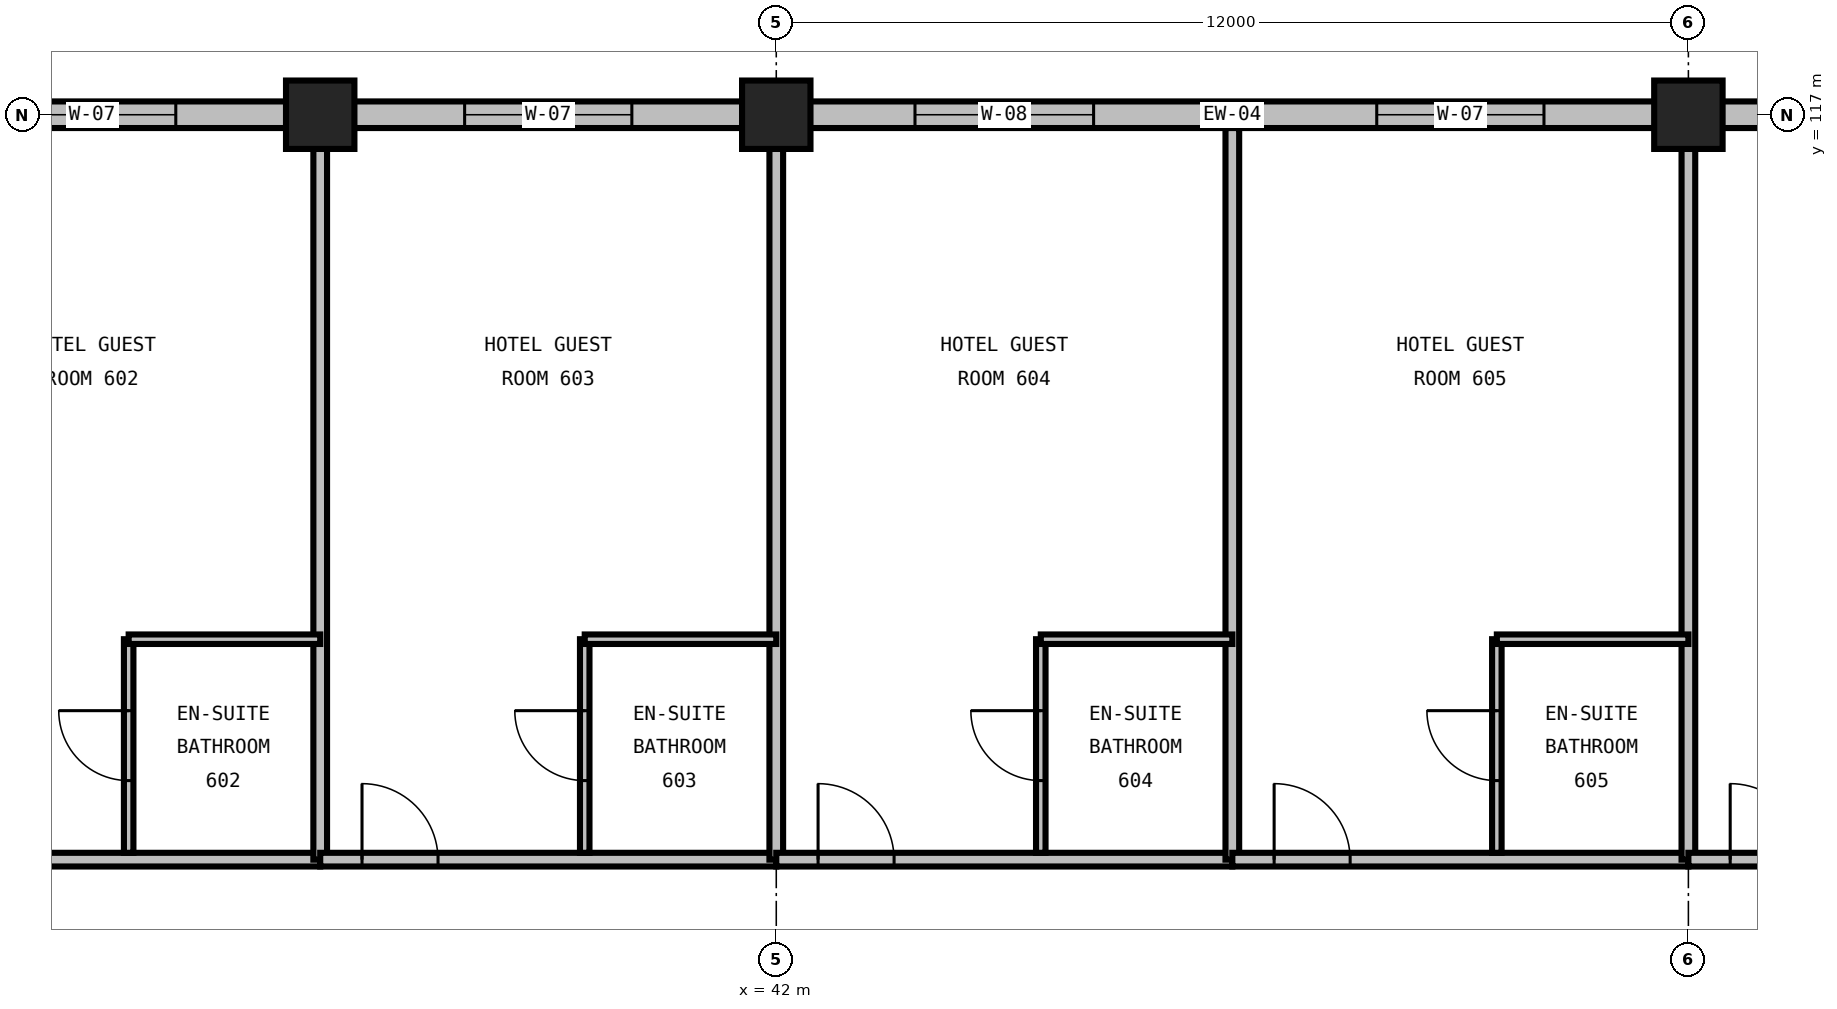
"""IFC4 building model, lengths in metres.
Left out: names, types, materials, properties, quantities, classifications, styles, units other than length and angle.
Written with IfcOpenShell. Run it as: python <this file> out.ifc"""

import sys

from ifc_helpers import new_model, si_unit, direction, frame, frame_2d, origin, origin_2d, place, context, subcontext, project, spatial, rectangle, extrude, element, fill, save


model = new_model("IFC4")
c1 = context("Model", 3, precision=1e-05, world=origin(), true_north=direction((0.0, 1.0)))
c2 = subcontext(c1, "Body", "Model", "MODEL_VIEW")
j1 = project(units=[si_unit("LENGTHUNIT", "METRE"), si_unit("PLANEANGLEUNIT", "RADIAN")], contexts=[c1])
p1 = place(None, origin())
s1 = spatial("IfcSite", under=j1, at=p1, CompositionType="ELEMENT")
p2 = place(p1, origin())
s2 = spatial("IfcBuilding", under=s1, at=p2, CompositionType="ELEMENT")
p3 = place(p2, frame((0.0, 0.0, 31.2)))
s3 = spatial("IfcBuildingStorey", under=s2, at=p3, CompositionType="ELEMENT", Elevation=31.2)
for number, where, z_axis, x_axis in (
    (1, (36.0, 117.0, 0.0), (0.0, 0.0, 1.0), (1.0, 0.0, 0.0)),
    (2, (42.0, 117.0, 0.0), (0.0, 0.0, 1.0), (1.0, 0.0, 0.0)),
    (3, (54.0, 117.0, 0.0), (0.0, 0.0, 1.0), (1.0, 0.0, 0.0)),
):
    element("IfcColumn", number, at=place(p3, frame(where, z_axis=z_axis, x_axis=x_axis)), inside=s3, PredefinedType="COLUMN", context=c2, shape_type="SweptSolid", body=[
        extrude(rectangle(XDim=0.9, YDim=0.9, at=origin_2d()), origin(), (0.0, 0.0, 1.0), 3.6),
    ])
p4 = place(p3, frame((36.0, 117.0, 0.0), z_axis=(0.0, 0.0, 1.0), x_axis=(-1.0, 0.0, 0.0)))
e4 = element("IfcWall", 4, at=p4, inside=s3, PredefinedType="STANDARD", context=c2, shape_type="SweptSolid", body=[
    extrude(rectangle(XDim=6.0, YDim=0.35, at=frame_2d((3.0, 0.0))), origin(), (0.0, 0.0, 1.0), 2.486),
])
p5 = place(p4, frame((1.9, 0.0, 0.75)))
e5 = element("IfcOpeningElement", 5, at=p5, cuts=e4, PredefinedType="OPENING", context=c2, shape_type="SweptSolid", body=[
    extrude(rectangle(XDim=2.2, YDim=1.6, at=frame_2d((1.1, 0.8))), frame((0.0, 0.19, 0.0), z_axis=(0.0, -1.0, 0.0), x_axis=(1.0, 0.0, 0.0)), (0.0, 0.0, 1.0), 0.38),
])
p6 = place(p3, frame((42.0, 117.0, 0.0), z_axis=(0.0, 0.0, 1.0), x_axis=(-1.0, 0.0, 0.0)))
e6 = element("IfcWall", 6, at=p6, inside=s3, PredefinedType="STANDARD", context=c2, shape_type="SweptSolid", body=[
    extrude(rectangle(XDim=6.0, YDim=0.35, at=frame_2d((3.0, 0.0))), origin(), (0.0, 0.0, 1.0), 2.486),
])
p7 = place(p6, frame((1.9, 0.0, 0.75)))
e7 = element("IfcOpeningElement", 7, at=p7, cuts=e6, PredefinedType="OPENING", context=c2, shape_type="SweptSolid", body=[
    extrude(rectangle(XDim=2.2, YDim=1.6, at=frame_2d((1.1, 0.8))), frame((0.0, 0.19, 0.0), z_axis=(0.0, -1.0, 0.0), x_axis=(1.0, 0.0, 0.0)), (0.0, 0.0, 1.0), 0.38),
])
p8 = place(p3, frame((54.0, 117.0, 0.0), z_axis=(0.0, 0.0, 1.0), x_axis=(-1.0, 0.0, 0.0)))
e8 = element("IfcWall", 8, at=p8, inside=s3, PredefinedType="STANDARD", context=c2, shape_type="SweptSolid", body=[
    extrude(rectangle(XDim=12.0, YDim=0.35, at=frame_2d((6.0, 0.0))), origin(), (0.0, 0.0, 1.0), 2.486),
])
p9 = place(p8, frame((1.9, 0.0, 0.75)))
e9 = element("IfcOpeningElement", 9, at=p9, cuts=e8, PredefinedType="OPENING", context=c2, shape_type="SweptSolid", body=[
    extrude(rectangle(XDim=2.2, YDim=1.6, at=frame_2d((1.1, 0.8))), frame((0.0, 0.19, 0.0), z_axis=(0.0, -1.0, 0.0), x_axis=(1.0, 0.0, 0.0)), (0.0, 0.0, 1.0), 0.38),
])
p10 = place(p8, frame((7.825, 0.0, 0.75)))
e10 = element("IfcOpeningElement", 10, at=p10, cuts=e8, PredefinedType="OPENING", context=c2, shape_type="SweptSolid", body=[
    extrude(rectangle(XDim=2.35, YDim=1.6, at=frame_2d((1.175, 0.8))), frame((0.0, 0.19, 0.0), z_axis=(0.0, -1.0, 0.0), x_axis=(1.0, 0.0, 0.0)), (0.0, 0.0, 1.0), 0.38),
])
p11 = place(p3, frame((66.0, 117.0, 0.0), z_axis=(0.0, 0.0, 1.0), x_axis=(-1.0, 0.0, 0.0)))
e11 = element("IfcWall", 11, at=p11, inside=s3, PredefinedType="STANDARD", context=c2, shape_type="SweptSolid", body=[
    extrude(rectangle(XDim=12.0, YDim=0.35, at=frame_2d((6.0, 0.0))), origin(), (0.0, 0.0, 1.0), 2.486),
])
p12 = place(p11, frame((1.9, 0.0, 0.75)))
e12 = element("IfcOpeningElement", 12, at=p12, cuts=e11, PredefinedType="OPENING", context=c2, shape_type="SweptSolid", body=[
    extrude(rectangle(XDim=2.2, YDim=1.6, at=frame_2d((1.1, 0.8))), frame((0.0, 0.19, 0.0), z_axis=(0.0, -1.0, 0.0), x_axis=(1.0, 0.0, 0.0)), (0.0, 0.0, 1.0), 0.38),
])
p13 = place(p11, frame((7.825, 0.0, 0.75)))
e13 = element("IfcOpeningElement", 13, at=p13, cuts=e11, PredefinedType="OPENING", context=c2, shape_type="SweptSolid", body=[
    extrude(rectangle(XDim=2.35, YDim=1.6, at=frame_2d((1.175, 0.8))), frame((0.0, 0.19, 0.0), z_axis=(0.0, -1.0, 0.0), x_axis=(1.0, 0.0, 0.0)), (0.0, 0.0, 1.0), 0.38),
])
p14 = place(p3, frame((30.0, 107.2, 0.0), z_axis=(0.0, 0.0, 1.0), x_axis=(1.0, 0.0, 0.0)))
e14 = element("IfcWall", 14, at=p14, inside=s3, PredefinedType="PARTITIONING", context=c2, shape_type="SweptSolid", body=[
    extrude(rectangle(XDim=6.0, YDim=0.18, at=frame_2d((3.0, 0.0))), origin(), (0.0, 0.0, 1.0), 3.29),
])
p15 = place(p14, frame((0.55, 0.0, 0.0)))
e15 = element("IfcOpeningElement", 15, at=p15, cuts=e14, PredefinedType="OPENING", context=c2, shape_type="SweptSolid", body=[
    extrude(rectangle(XDim=1.0, YDim=2.15, at=frame_2d((0.5, 1.075))), frame((0.0, 0.105, 0.0), z_axis=(0.0, -1.0, 0.0), x_axis=(1.0, 0.0, 0.0)), (0.0, 0.0, 1.0), 0.21),
])
p16 = place(p3, frame((36.0, 107.2, 0.0), z_axis=(0.0, 0.0, 1.0), x_axis=(0.0, 1.0, 0.0)))
e16 = element("IfcWall", 16, at=p16, inside=s3, PredefinedType="PARTITIONING", context=c2, shape_type="SweptSolid", body=[
    extrude(rectangle(XDim=9.625, YDim=0.18, at=frame_2d((4.812, 0.0))), origin(), (0.0, 0.0, 1.0), 2.59),
])
p17 = place(p3, frame((33.48, 107.29, 0.0), z_axis=(0.0, 0.0, 1.0), x_axis=(0.0, 1.0, 0.0)))
e17 = element("IfcWall", 17, at=p17, inside=s3, PredefinedType="PARTITIONING", context=c2, shape_type="SweptSolid", body=[
    extrude(rectangle(XDim=2.81, YDim=0.125, at=frame_2d((1.405, 0.0))), origin(), (0.0, 0.0, 1.0), 3.29),
])
p18 = place(p17, frame((0.95, 0.0, 0.0)))
e18 = element("IfcOpeningElement", 18, at=p18, cuts=e17, PredefinedType="OPENING", context=c2, shape_type="SweptSolid", body=[
    extrude(rectangle(XDim=0.92, YDim=2.1, at=frame_2d((0.46, 1.05))), frame((0.0, 0.077, 0.0), z_axis=(0.0, -1.0, 0.0), x_axis=(1.0, 0.0, 0.0)), (0.0, 0.0, 1.0), 0.155),
])
p19 = place(p3, frame((33.48, 110.1, 0.0), z_axis=(0.0, 0.0, 1.0), x_axis=(1.0, 0.0, 0.0)))
e19 = element("IfcWall", 19, at=p19, inside=s3, PredefinedType="PARTITIONING", context=c2, shape_type="SweptSolid", body=[
    extrude(rectangle(XDim=2.52, YDim=0.125, at=frame_2d((1.26, 0.0))), origin(), (0.0, 0.0, 1.0), 3.29),
])
p20 = place(p3, frame((36.0, 107.2, 0.0), z_axis=(0.0, 0.0, 1.0), x_axis=(1.0, 0.0, 0.0)))
e20 = element("IfcWall", 20, at=p20, inside=s3, PredefinedType="PARTITIONING", context=c2, shape_type="SweptSolid", body=[
    extrude(rectangle(XDim=6.0, YDim=0.18, at=frame_2d((3.0, 0.0))), origin(), (0.0, 0.0, 1.0), 3.29),
])
p21 = place(p20, frame((0.55, 0.0, 0.0)))
e21 = element("IfcOpeningElement", 21, at=p21, cuts=e20, PredefinedType="OPENING", context=c2, shape_type="SweptSolid", body=[
    extrude(rectangle(XDim=1.0, YDim=2.15, at=frame_2d((0.5, 1.075))), frame((0.0, 0.105, 0.0), z_axis=(0.0, -1.0, 0.0), x_axis=(1.0, 0.0, 0.0)), (0.0, 0.0, 1.0), 0.21),
])
p22 = place(p3, frame((42.0, 107.2, 0.0), z_axis=(0.0, 0.0, 1.0), x_axis=(0.0, 1.0, 0.0)))
e22 = element("IfcWall", 22, at=p22, inside=s3, PredefinedType="PARTITIONING", context=c2, shape_type="SweptSolid", body=[
    extrude(rectangle(XDim=9.625, YDim=0.18, at=frame_2d((4.812, 0.0))), origin(), (0.0, 0.0, 1.0), 2.59),
])
p23 = place(p3, frame((39.48, 107.29, 0.0), z_axis=(0.0, 0.0, 1.0), x_axis=(0.0, 1.0, 0.0)))
e23 = element("IfcWall", 23, at=p23, inside=s3, PredefinedType="PARTITIONING", context=c2, shape_type="SweptSolid", body=[
    extrude(rectangle(XDim=2.81, YDim=0.125, at=frame_2d((1.405, 0.0))), origin(), (0.0, 0.0, 1.0), 3.29),
])
p24 = place(p23, frame((0.95, 0.0, 0.0)))
e24 = element("IfcOpeningElement", 24, at=p24, cuts=e23, PredefinedType="OPENING", context=c2, shape_type="SweptSolid", body=[
    extrude(rectangle(XDim=0.92, YDim=2.1, at=frame_2d((0.46, 1.05))), frame((0.0, 0.077, 0.0), z_axis=(0.0, -1.0, 0.0), x_axis=(1.0, 0.0, 0.0)), (0.0, 0.0, 1.0), 0.155),
])
p25 = place(p3, frame((39.48, 110.1, 0.0), z_axis=(0.0, 0.0, 1.0), x_axis=(1.0, 0.0, 0.0)))
e25 = element("IfcWall", 25, at=p25, inside=s3, PredefinedType="PARTITIONING", context=c2, shape_type="SweptSolid", body=[
    extrude(rectangle(XDim=2.52, YDim=0.125, at=frame_2d((1.26, 0.0))), origin(), (0.0, 0.0, 1.0), 3.29),
])
p26 = place(p3, frame((42.0, 107.2, 0.0), z_axis=(0.0, 0.0, 1.0), x_axis=(1.0, 0.0, 0.0)))
e26 = element("IfcWall", 26, at=p26, inside=s3, PredefinedType="PARTITIONING", context=c2, shape_type="SweptSolid", body=[
    extrude(rectangle(XDim=6.0, YDim=0.18, at=frame_2d((3.0, 0.0))), origin(), (0.0, 0.0, 1.0), 3.29),
])
p27 = place(p26, frame((0.55, 0.0, 0.0)))
e27 = element("IfcOpeningElement", 27, at=p27, cuts=e26, PredefinedType="OPENING", context=c2, shape_type="SweptSolid", body=[
    extrude(rectangle(XDim=1.0, YDim=2.15, at=frame_2d((0.5, 1.075))), frame((0.0, 0.105, 0.0), z_axis=(0.0, -1.0, 0.0), x_axis=(1.0, 0.0, 0.0)), (0.0, 0.0, 1.0), 0.21),
])
p28 = place(p3, frame((48.0, 107.2, 0.0), z_axis=(0.0, 0.0, 1.0), x_axis=(0.0, 1.0, 0.0)))
e28 = element("IfcWall", 28, at=p28, inside=s3, PredefinedType="PARTITIONING", context=c2, shape_type="SweptSolid", body=[
    extrude(rectangle(XDim=9.625, YDim=0.18, at=frame_2d((4.812, 0.0))), origin(), (0.0, 0.0, 1.0), 3.29),
])
p29 = place(p3, frame((45.48, 107.29, 0.0), z_axis=(0.0, 0.0, 1.0), x_axis=(0.0, 1.0, 0.0)))
e29 = element("IfcWall", 29, at=p29, inside=s3, PredefinedType="PARTITIONING", context=c2, shape_type="SweptSolid", body=[
    extrude(rectangle(XDim=2.81, YDim=0.125, at=frame_2d((1.405, 0.0))), origin(), (0.0, 0.0, 1.0), 3.29),
])
p30 = place(p29, frame((0.95, 0.0, 0.0)))
e30 = element("IfcOpeningElement", 30, at=p30, cuts=e29, PredefinedType="OPENING", context=c2, shape_type="SweptSolid", body=[
    extrude(rectangle(XDim=0.92, YDim=2.1, at=frame_2d((0.46, 1.05))), frame((0.0, 0.077, 0.0), z_axis=(0.0, -1.0, 0.0), x_axis=(1.0, 0.0, 0.0)), (0.0, 0.0, 1.0), 0.155),
])
p31 = place(p3, frame((45.48, 110.1, 0.0), z_axis=(0.0, 0.0, 1.0), x_axis=(1.0, 0.0, 0.0)))
e31 = element("IfcWall", 31, at=p31, inside=s3, PredefinedType="PARTITIONING", context=c2, shape_type="SweptSolid", body=[
    extrude(rectangle(XDim=2.52, YDim=0.125, at=frame_2d((1.26, 0.0))), origin(), (0.0, 0.0, 1.0), 3.29),
])
p32 = place(p3, frame((48.0, 107.2, 0.0), z_axis=(0.0, 0.0, 1.0), x_axis=(1.0, 0.0, 0.0)))
e32 = element("IfcWall", 32, at=p32, inside=s3, PredefinedType="PARTITIONING", context=c2, shape_type="SweptSolid", body=[
    extrude(rectangle(XDim=6.0, YDim=0.18, at=frame_2d((3.0, 0.0))), origin(), (0.0, 0.0, 1.0), 3.29),
])
p33 = place(p32, frame((0.55, 0.0, 0.0)))
e33 = element("IfcOpeningElement", 33, at=p33, cuts=e32, PredefinedType="OPENING", context=c2, shape_type="SweptSolid", body=[
    extrude(rectangle(XDim=1.0, YDim=2.15, at=frame_2d((0.5, 1.075))), frame((0.0, 0.105, 0.0), z_axis=(0.0, -1.0, 0.0), x_axis=(1.0, 0.0, 0.0)), (0.0, 0.0, 1.0), 0.21),
])
p34 = place(p3, frame((54.0, 107.2, 0.0), z_axis=(0.0, 0.0, 1.0), x_axis=(0.0, 1.0, 0.0)))
e34 = element("IfcWall", 34, at=p34, inside=s3, PredefinedType="PARTITIONING", context=c2, shape_type="SweptSolid", body=[
    extrude(rectangle(XDim=9.625, YDim=0.18, at=frame_2d((4.812, 0.0))), origin(), (0.0, 0.0, 1.0), 2.59),
])
p35 = place(p3, frame((51.48, 107.29, 0.0), z_axis=(0.0, 0.0, 1.0), x_axis=(0.0, 1.0, 0.0)))
e35 = element("IfcWall", 35, at=p35, inside=s3, PredefinedType="PARTITIONING", context=c2, shape_type="SweptSolid", body=[
    extrude(rectangle(XDim=2.81, YDim=0.125, at=frame_2d((1.405, 0.0))), origin(), (0.0, 0.0, 1.0), 3.29),
])
p36 = place(p35, frame((0.95, 0.0, 0.0)))
e36 = element("IfcOpeningElement", 36, at=p36, cuts=e35, PredefinedType="OPENING", context=c2, shape_type="SweptSolid", body=[
    extrude(rectangle(XDim=0.92, YDim=2.1, at=frame_2d((0.46, 1.05))), frame((0.0, 0.077, 0.0), z_axis=(0.0, -1.0, 0.0), x_axis=(1.0, 0.0, 0.0)), (0.0, 0.0, 1.0), 0.155),
])
p37 = place(p3, frame((51.48, 110.1, 0.0), z_axis=(0.0, 0.0, 1.0), x_axis=(1.0, 0.0, 0.0)))
e37 = element("IfcWall", 37, at=p37, inside=s3, PredefinedType="PARTITIONING", context=c2, shape_type="SweptSolid", body=[
    extrude(rectangle(XDim=2.52, YDim=0.125, at=frame_2d((1.26, 0.0))), origin(), (0.0, 0.0, 1.0), 3.29),
])
p38 = place(p3, frame((54.0, 107.2, 0.0), z_axis=(0.0, 0.0, 1.0), x_axis=(1.0, 0.0, 0.0)))
e38 = element("IfcWall", 38, at=p38, inside=s3, PredefinedType="PARTITIONING", context=c2, shape_type="SweptSolid", body=[
    extrude(rectangle(XDim=6.0, YDim=0.18, at=frame_2d((3.0, 0.0))), origin(), (0.0, 0.0, 1.0), 3.29),
])
p39 = place(p38, frame((0.55, 0.0, 0.0)))
e39 = element("IfcOpeningElement", 39, at=p39, cuts=e38, PredefinedType="OPENING", context=c2, shape_type="SweptSolid", body=[
    extrude(rectangle(XDim=1.0, YDim=2.15, at=frame_2d((0.5, 1.075))), frame((0.0, 0.105, 0.0), z_axis=(0.0, -1.0, 0.0), x_axis=(1.0, 0.0, 0.0)), (0.0, 0.0, 1.0), 0.21),
])
p40 = place(p5, origin())
e40 = element("IfcWindow", 40, at=p40, inside=s3, PartitioningType="DOUBLE_PANEL_VERTICAL", PredefinedType="WINDOW", context=c2, shape_type="SweptSolid", body=[
    extrude(rectangle(XDim=2.2, YDim=1.6, at=frame_2d((1.1, 0.8))), frame((0.0, 0.03, 0.0), z_axis=(0.0, -1.0, 0.0), x_axis=(1.0, 0.0, 0.0)), (0.0, 0.0, 1.0), 0.06),
])
fill(e5, e40)
p41 = place(p7, origin())
e41 = element("IfcWindow", 41, at=p41, inside=s3, PartitioningType="DOUBLE_PANEL_VERTICAL", PredefinedType="WINDOW", context=c2, shape_type="SweptSolid", body=[
    extrude(rectangle(XDim=2.2, YDim=1.6, at=frame_2d((1.1, 0.8))), frame((0.0, 0.03, 0.0), z_axis=(0.0, -1.0, 0.0), x_axis=(1.0, 0.0, 0.0)), (0.0, 0.0, 1.0), 0.06),
])
fill(e7, e41)
p42 = place(p9, origin())
e42 = element("IfcWindow", 42, at=p42, inside=s3, PartitioningType="DOUBLE_PANEL_VERTICAL", PredefinedType="WINDOW", context=c2, shape_type="SweptSolid", body=[
    extrude(rectangle(XDim=2.2, YDim=1.6, at=frame_2d((1.1, 0.8))), frame((0.0, 0.03, 0.0), z_axis=(0.0, -1.0, 0.0), x_axis=(1.0, 0.0, 0.0)), (0.0, 0.0, 1.0), 0.06),
])
fill(e9, e42)
p43 = place(p10, origin())
e43 = element("IfcWindow", 43, at=p43, inside=s3, PartitioningType="DOUBLE_PANEL_VERTICAL", PredefinedType="WINDOW", context=c2, shape_type="SweptSolid", body=[
    extrude(rectangle(XDim=2.35, YDim=1.6, at=frame_2d((1.175, 0.8))), frame((0.0, 0.03, 0.0), z_axis=(0.0, -1.0, 0.0), x_axis=(1.0, 0.0, 0.0)), (0.0, 0.0, 1.0), 0.06),
])
fill(e10, e43)
p44 = place(p18, origin())
e44 = element("IfcDoor", 44, at=p44, inside=s3, OperationType="SINGLE_SWING_RIGHT", PredefinedType="DOOR", context=c2, shape_type="SweptSolid", body=[
    extrude(rectangle(XDim=0.92, YDim=2.1, at=frame_2d((0.46, 1.05))), frame((0.0, 0.025, 0.0), z_axis=(0.0, -1.0, 0.0), x_axis=(1.0, 0.0, 0.0)), (0.0, 0.0, 1.0), 0.05),
])
fill(e18, e44)
p45 = place(p21, origin())
e45 = element("IfcDoor", 45, at=p45, inside=s3, OperationType="SINGLE_SWING_LEFT", PredefinedType="DOOR", context=c2, shape_type="SweptSolid", body=[
    extrude(rectangle(XDim=1.0, YDim=2.15, at=frame_2d((0.5, 1.075))), frame((0.0, 0.025, 0.0), z_axis=(0.0, -1.0, 0.0), x_axis=(1.0, 0.0, 0.0)), (0.0, 0.0, 1.0), 0.05),
])
fill(e21, e45)
p46 = place(p24, origin())
e46 = element("IfcDoor", 46, at=p46, inside=s3, OperationType="SINGLE_SWING_RIGHT", PredefinedType="DOOR", context=c2, shape_type="SweptSolid", body=[
    extrude(rectangle(XDim=0.92, YDim=2.1, at=frame_2d((0.46, 1.05))), frame((0.0, 0.025, 0.0), z_axis=(0.0, -1.0, 0.0), x_axis=(1.0, 0.0, 0.0)), (0.0, 0.0, 1.0), 0.05),
])
fill(e24, e46)
p47 = place(p27, origin())
e47 = element("IfcDoor", 47, at=p47, inside=s3, OperationType="SINGLE_SWING_LEFT", PredefinedType="DOOR", context=c2, shape_type="SweptSolid", body=[
    extrude(rectangle(XDim=1.0, YDim=2.15, at=frame_2d((0.5, 1.075))), frame((0.0, 0.025, 0.0), z_axis=(0.0, -1.0, 0.0), x_axis=(1.0, 0.0, 0.0)), (0.0, 0.0, 1.0), 0.05),
])
fill(e27, e47)
p48 = place(p30, origin())
e48 = element("IfcDoor", 48, at=p48, inside=s3, OperationType="SINGLE_SWING_RIGHT", PredefinedType="DOOR", context=c2, shape_type="SweptSolid", body=[
    extrude(rectangle(XDim=0.92, YDim=2.1, at=frame_2d((0.46, 1.05))), frame((0.0, 0.025, 0.0), z_axis=(0.0, -1.0, 0.0), x_axis=(1.0, 0.0, 0.0)), (0.0, 0.0, 1.0), 0.05),
])
fill(e30, e48)
p49 = place(p33, origin())
e49 = element("IfcDoor", 49, at=p49, inside=s3, OperationType="SINGLE_SWING_LEFT", PredefinedType="DOOR", context=c2, shape_type="SweptSolid", body=[
    extrude(rectangle(XDim=1.0, YDim=2.15, at=frame_2d((0.5, 1.075))), frame((0.0, 0.025, 0.0), z_axis=(0.0, -1.0, 0.0), x_axis=(1.0, 0.0, 0.0)), (0.0, 0.0, 1.0), 0.05),
])
fill(e33, e49)
p50 = place(p36, origin())
e50 = element("IfcDoor", 50, at=p50, inside=s3, OperationType="SINGLE_SWING_RIGHT", PredefinedType="DOOR", context=c2, shape_type="SweptSolid", body=[
    extrude(rectangle(XDim=0.92, YDim=2.1, at=frame_2d((0.46, 1.05))), frame((0.0, 0.025, 0.0), z_axis=(0.0, -1.0, 0.0), x_axis=(1.0, 0.0, 0.0)), (0.0, 0.0, 1.0), 0.05),
])
fill(e36, e50)
p51 = place(p39, origin())
e51 = element("IfcDoor", 51, at=p51, inside=s3, OperationType="SINGLE_SWING_LEFT", PredefinedType="DOOR", context=c2, shape_type="SweptSolid", body=[
    extrude(rectangle(XDim=1.0, YDim=2.15, at=frame_2d((0.5, 1.075))), frame((0.0, 0.025, 0.0), z_axis=(0.0, -1.0, 0.0), x_axis=(1.0, 0.0, 0.0)), (0.0, 0.0, 1.0), 0.05),
])
fill(e39, e51)
save(model, sys.argv[1])
